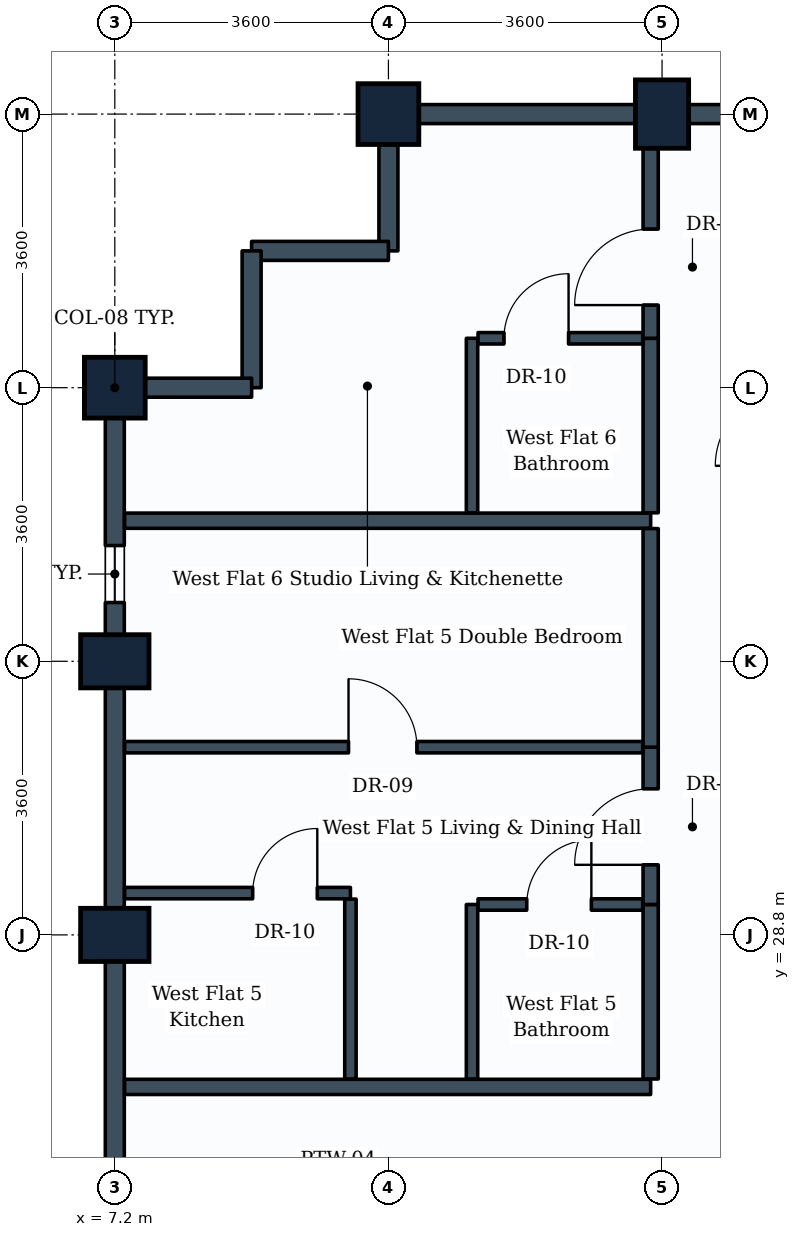
"""IFC4 building model, lengths in metres.
Left out: names, types, materials, properties, quantities, classifications, styles, units other than length and angle.
Written with IfcOpenShell. Run it as: python <this file> out.ifc"""

import sys

from ifc_helpers import new_model, si_unit, direction, frame, frame_2d, origin, origin_2d, place, context, subcontext, project, spatial, rectangle, extrude, element, fill, save


model = new_model("IFC4")
c1 = context("Model", 3, precision=1e-05, world=origin(), true_north=direction((0.0, 1.0)))
c2 = subcontext(c1, "Body", "Model", "MODEL_VIEW")
j1 = project(units=[si_unit("LENGTHUNIT", "METRE"), si_unit("PLANEANGLEUNIT", "RADIAN")], contexts=[c1])
p1 = place(None, origin())
s1 = spatial("IfcSite", under=j1, at=p1, CompositionType="ELEMENT")
p2 = place(p1, origin())
s2 = spatial("IfcBuilding", under=s1, at=p2, CompositionType="ELEMENT")
p3 = place(p2, frame((0.0, 0.0, 186.2)))
s3 = spatial("IfcBuildingStorey", under=s2, at=p3, CompositionType="ELEMENT", Elevation=186.2)
for number, where, z_axis, x_axis in (
    (1, (7.2, 28.8, 0.0), (0.0, 0.0, 1.0), (0.0, 1.0, 0.0)),
    (2, (7.2, 32.4, 0.0), (0.0, 0.0, 1.0), (0.0, 1.0, 0.0)),
):
    element("IfcColumn", number, at=place(p3, frame(where, z_axis=z_axis, x_axis=x_axis)), inside=s3, PredefinedType="COLUMN", context=c2, shape_type="SweptSolid", body=[
        extrude(rectangle(XDim=0.7, YDim=0.9, at=origin_2d()), origin(), (0.0, 0.0, 1.0), 3.8),
    ])
for number, where, z_axis, x_axis in (
    (3, (7.2, 36.0, 0.0), (0.0, 0.0, 1.0), (0.0, 1.0, 0.0)),
    (4, (10.8, 39.6, 0.0), (0.0, 0.0, 1.0), (1.0, 0.0, 0.0)),
):
    element("IfcColumn", number, at=place(p3, frame(where, z_axis=z_axis, x_axis=x_axis)), inside=s3, PredefinedType="COLUMN", context=c2, shape_type="SweptSolid", body=[
        extrude(rectangle(XDim=0.8, YDim=0.8, at=origin_2d()), origin(), (0.0, 0.0, 1.0), 3.8),
    ])
p4 = place(p3, frame((14.4, 39.6, 0.0), z_axis=(0.0, 0.0, 1.0), x_axis=(1.0, 0.0, 0.0)))
e5 = element("IfcColumn", 5, at=p4, inside=s3, PredefinedType="COLUMN", context=c2, shape_type="SweptSolid", body=[
    extrude(rectangle(XDim=0.7, YDim=0.9, at=origin_2d()), origin(), (0.0, 0.0, 1.0), 3.8),
])
p5 = place(p3, frame((14.4, 39.6, 0.0), z_axis=(0.0, 0.0, 1.0), x_axis=(1.0, 0.0, 0.0)))
e6 = element("IfcWall", 6, at=p5, inside=s3, PredefinedType="STANDARD", context=c2, shape_type="SweptSolid", body=[
    extrude(rectangle(XDim=3.6, YDim=0.25, at=frame_2d((1.8, 0.0))), origin(), (0.0, 0.0, 1.0), 2.93),
])
p6 = place(p3, frame((10.8, 39.6, 0.0), z_axis=(0.0, 0.0, 1.0), x_axis=(1.0, 0.0, 0.0)))
e7 = element("IfcWall", 7, at=p6, inside=s3, PredefinedType="STANDARD", context=c2, shape_type="SweptSolid", body=[
    extrude(rectangle(XDim=3.6, YDim=0.25, at=frame_2d((1.8, 0.0))), origin(), (0.0, 0.0, 1.0), 2.93),
])
p7 = place(p3, frame((10.8, 37.8, 0.0), z_axis=(0.0, 0.0, 1.0), x_axis=(0.0, 1.0, 0.0)))
e8 = element("IfcWall", 8, at=p7, inside=s3, PredefinedType="STANDARD", context=c2, shape_type="SweptSolid", body=[
    extrude(rectangle(XDim=1.8, YDim=0.25, at=frame_2d((0.9, 0.0))), origin(), (0.0, 0.0, 1.0), 2.93),
])
for number, where, z_axis, x_axis in (
    (9, (9.0, 37.8, 0.0), (0.0, 0.0, 1.0), (1.0, 0.0, 0.0)),
    (10, (9.0, 36.0, 0.0), (0.0, 0.0, 1.0), (0.0, 1.0, 0.0)),
):
    element("IfcWall", number, at=place(p3, frame(where, z_axis=z_axis, x_axis=x_axis)), inside=s3, PredefinedType="STANDARD", context=c2, shape_type="SweptSolid", body=[
        extrude(rectangle(XDim=1.8, YDim=0.25, at=frame_2d((0.9, 0.0))), origin(), (0.0, 0.0, 1.0), 3.535),
    ])
p8 = place(p3, frame((7.2, 36.0, 0.0), z_axis=(0.0, 0.0, 1.0), x_axis=(1.0, 0.0, 0.0)))
e11 = element("IfcWall", 11, at=p8, inside=s3, PredefinedType="STANDARD", context=c2, shape_type="SweptSolid", body=[
    extrude(rectangle(XDim=1.8, YDim=0.25, at=frame_2d((0.9, 0.0))), origin(), (0.0, 0.0, 1.0), 2.93),
])
p9 = place(p3, frame((7.2, 32.4, 0.0), z_axis=(0.0, 0.0, 1.0), x_axis=(0.0, 1.0, 0.0)))
e12 = element("IfcWall", 12, at=p9, inside=s3, PredefinedType="STANDARD", context=c2, shape_type="SweptSolid", body=[
    extrude(rectangle(XDim=3.6, YDim=0.25, at=frame_2d((1.8, 0.0))), origin(), (0.0, 0.0, 1.0), 2.93),
])
p10 = place(p9, frame((0.773, 0.0, 0.85)))
e13 = element("IfcOpeningElement", 13, at=p10, cuts=e12, PredefinedType="OPENING", context=c2, shape_type="SweptSolid", body=[
    extrude(rectangle(XDim=0.75, YDim=1.05, at=frame_2d((0.375, 0.525))), frame((0.0, 0.135, 0.0), z_axis=(0.0, -1.0, 0.0), x_axis=(1.0, 0.0, 0.0)), (0.0, 0.0, 1.0), 0.27),
])
p11 = place(p3, frame((7.2, 28.8, 0.0), z_axis=(0.0, 0.0, 1.0), x_axis=(0.0, 1.0, 0.0)))
e14 = element("IfcWall", 14, at=p11, inside=s3, PredefinedType="STANDARD", context=c2, shape_type="SweptSolid", body=[
    extrude(rectangle(XDim=3.6, YDim=0.25, at=frame_2d((1.8, 0.0))), origin(), (0.0, 0.0, 1.0), 2.93),
])
p12 = place(p3, frame((7.2, 25.2, 0.0), z_axis=(0.0, 0.0, 1.0), x_axis=(0.0, 1.0, 0.0)))
e15 = element("IfcWall", 15, at=p12, inside=s3, PredefinedType="STANDARD", context=c2, shape_type="SweptSolid", body=[
    extrude(rectangle(XDim=3.6, YDim=0.25, at=frame_2d((1.8, 0.0))), origin(), (0.0, 0.0, 1.0), 2.93),
])
for number, where, z_axis, x_axis in (
    (16, (7.329, 26.8, 0.0), (0.0, 0.0, 1.0), (1.0, 0.0, 0.0)),
    (17, (7.329, 34.25, 0.0), (0.0, 0.0, 1.0), (1.0, 0.0, 0.0)),
):
    element("IfcWall", number, at=place(p3, frame(where, z_axis=z_axis, x_axis=x_axis)), inside=s3, PredefinedType="PARTITIONING", context=c2, shape_type="SweptSolid", body=[
        extrude(rectangle(XDim=6.921, YDim=0.2, at=frame_2d((3.46, 0.0))), origin(), (0.0, 0.0, 1.0), 2.93),
    ])
p13 = place(p3, frame((14.25, 26.904, 0.0), z_axis=(0.0, 0.0, 1.0), x_axis=(0.0, 1.0, 0.0)))
e18 = element("IfcWall", 18, at=p13, inside=s3, PredefinedType="PARTITIONING", context=c2, shape_type="SweptSolid", body=[
    extrude(rectangle(XDim=2.296, YDim=0.2, at=frame_2d((1.148, 0.0))), origin(), (0.0, 0.0, 1.0), 3.17),
])
p14 = place(p3, frame((11.9, 26.904, 0.0), z_axis=(0.0, 0.0, 1.0), x_axis=(0.0, 1.0, 0.0)))
e19 = element("IfcWall", 19, at=p14, inside=s3, PredefinedType="PARTITIONING", context=c2, shape_type="SweptSolid", body=[
    extrude(rectangle(XDim=2.296, YDim=0.15, at=frame_2d((1.148, 0.0))), origin(), (0.0, 0.0, 1.0), 3.22),
])
p15 = place(p3, frame((11.979, 29.2, 0.0), z_axis=(0.0, 0.0, 1.0), x_axis=(1.0, 0.0, 0.0)))
e20 = element("IfcWall", 20, at=p15, inside=s3, PredefinedType="PARTITIONING", context=c2, shape_type="SweptSolid", body=[
    extrude(rectangle(XDim=2.167, YDim=0.15, at=frame_2d((1.083, 0.0))), origin(), (0.0, 0.0, 1.0), 3.535),
])
p16 = place(p15, frame((0.641, 0.0, 0.0)))
e21 = element("IfcOpeningElement", 21, at=p16, cuts=e20, PredefinedType="OPENING", context=c2, shape_type="SweptSolid", body=[
    extrude(rectangle(XDim=0.85, YDim=2.1, at=frame_2d((0.425, 1.05))), frame((0.0, 0.085, 0.0), z_axis=(0.0, -1.0, 0.0), x_axis=(1.0, 0.0, 0.0)), (0.0, 0.0, 1.0), 0.17),
])
p17 = place(p3, frame((14.25, 29.2, 0.0), z_axis=(0.0, 0.0, 1.0), x_axis=(0.0, 1.0, 0.0)))
e22 = element("IfcWall", 22, at=p17, inside=s3, PredefinedType="PARTITIONING", context=c2, shape_type="SweptSolid", body=[
    extrude(rectangle(XDim=2.07, YDim=0.2, at=frame_2d((1.035, 0.0))), origin(), (0.0, 0.0, 1.0), 3.17),
])
p18 = place(p17, frame((0.522, 0.0, 0.0)))
e23 = element("IfcOpeningElement", 23, at=p18, cuts=e22, PredefinedType="OPENING", context=c2, shape_type="SweptSolid", body=[
    extrude(rectangle(XDim=1.0, YDim=2.1, at=frame_2d((0.5, 1.05))), frame((0.0, 0.11, 0.0), z_axis=(0.0, -1.0, 0.0), x_axis=(1.0, 0.0, 0.0)), (0.0, 0.0, 1.0), 0.22),
])
p19 = place(p3, frame((14.25, 31.27, 0.0), z_axis=(0.0, 0.0, 1.0), x_axis=(0.0, 1.0, 0.0)))
e24 = element("IfcWall", 24, at=p19, inside=s3, PredefinedType="PARTITIONING", context=c2, shape_type="SweptSolid", body=[
    extrude(rectangle(XDim=2.876, YDim=0.2, at=frame_2d((1.438, 0.0))), origin(), (0.0, 0.0, 1.0), 3.17),
])
p20 = place(p3, frame((7.329, 31.27, 0.0), z_axis=(0.0, 0.0, 1.0), x_axis=(1.0, 0.0, 0.0)))
e25 = element("IfcWall", 25, at=p20, inside=s3, PredefinedType="PARTITIONING", context=c2, shape_type="SweptSolid", body=[
    extrude(rectangle(XDim=6.817, YDim=0.15, at=frame_2d((3.408, 0.0))), origin(), (0.0, 0.0, 1.0), 2.93),
])
p21 = place(p20, frame((2.946, 0.0, 0.0)))
e26 = element("IfcOpeningElement", 26, at=p21, cuts=e25, PredefinedType="OPENING", context=c2, shape_type="SweptSolid", body=[
    extrude(rectangle(XDim=0.9, YDim=2.1, at=frame_2d((0.45, 1.05))), frame((0.0, 0.085, 0.0), z_axis=(0.0, -1.0, 0.0), x_axis=(1.0, 0.0, 0.0)), (0.0, 0.0, 1.0), 0.17),
])
p22 = place(p3, frame((7.329, 29.35, 0.0), z_axis=(0.0, 0.0, 1.0), x_axis=(1.0, 0.0, 0.0)))
e27 = element("IfcWall", 27, at=p22, inside=s3, PredefinedType="PARTITIONING", context=c2, shape_type="SweptSolid", body=[
    extrude(rectangle(XDim=2.971, YDim=0.15, at=frame_2d((1.485, 0.0))), origin(), (0.0, 0.0, 1.0), 2.93),
])
p23 = place(p22, frame((1.685, 0.0, 0.0)))
e28 = element("IfcOpeningElement", 28, at=p23, cuts=e27, PredefinedType="OPENING", context=c2, shape_type="SweptSolid", body=[
    extrude(rectangle(XDim=0.85, YDim=2.1, at=frame_2d((0.425, 1.05))), frame((0.0, 0.085, 0.0), z_axis=(0.0, -1.0, 0.0), x_axis=(1.0, 0.0, 0.0)), (0.0, 0.0, 1.0), 0.17),
])
p24 = place(p3, frame((10.3, 26.904, 0.0), z_axis=(0.0, 0.0, 1.0), x_axis=(0.0, 1.0, 0.0)))
e29 = element("IfcWall", 29, at=p24, inside=s3, PredefinedType="PARTITIONING", context=c2, shape_type="SweptSolid", body=[
    extrude(rectangle(XDim=2.367, YDim=0.15, at=frame_2d((1.184, 0.0))), origin(), (0.0, 0.0, 1.0), 3.22),
])
p25 = place(p3, frame((14.25, 34.354, 0.0), z_axis=(0.0, 0.0, 1.0), x_axis=(0.0, 1.0, 0.0)))
e30 = element("IfcWall", 30, at=p25, inside=s3, PredefinedType="PARTITIONING", context=c2, shape_type="SweptSolid", body=[
    extrude(rectangle(XDim=2.296, YDim=0.2, at=frame_2d((1.148, 0.0))), origin(), (0.0, 0.0, 1.0), 3.535),
])
p26 = place(p3, frame((11.9, 34.354, 0.0), z_axis=(0.0, 0.0, 1.0), x_axis=(0.0, 1.0, 0.0)))
e31 = element("IfcWall", 31, at=p26, inside=s3, PredefinedType="PARTITIONING", context=c2, shape_type="SweptSolid", body=[
    extrude(rectangle(XDim=2.296, YDim=0.15, at=frame_2d((1.148, 0.0))), origin(), (0.0, 0.0, 1.0), 3.535),
])
p27 = place(p3, frame((11.979, 36.65, 0.0), z_axis=(0.0, 0.0, 1.0), x_axis=(1.0, 0.0, 0.0)))
e32 = element("IfcWall", 32, at=p27, inside=s3, PredefinedType="PARTITIONING", context=c2, shape_type="SweptSolid", body=[
    extrude(rectangle(XDim=2.167, YDim=0.15, at=frame_2d((1.083, 0.0))), origin(), (0.0, 0.0, 1.0), 3.535),
])
p28 = place(p27, frame((0.341, 0.0, 0.0)))
e33 = element("IfcOpeningElement", 33, at=p28, cuts=e32, PredefinedType="OPENING", context=c2, shape_type="SweptSolid", body=[
    extrude(rectangle(XDim=0.85, YDim=2.1, at=frame_2d((0.425, 1.05))), frame((0.0, 0.085, 0.0), z_axis=(0.0, -1.0, 0.0), x_axis=(1.0, 0.0, 0.0)), (0.0, 0.0, 1.0), 0.17),
])
p29 = place(p3, frame((14.25, 36.65, 0.0), z_axis=(0.0, 0.0, 1.0), x_axis=(0.0, 1.0, 0.0)))
e34 = element("IfcWall", 34, at=p29, inside=s3, PredefinedType="PARTITIONING", context=c2, shape_type="SweptSolid", body=[
    extrude(rectangle(XDim=2.821, YDim=0.2, at=frame_2d((1.411, 0.0))), origin(), (0.0, 0.0, 1.0), 2.93),
])
p30 = place(p29, frame((0.437, 0.0, 0.0)))
e35 = element("IfcOpeningElement", 35, at=p30, cuts=e34, PredefinedType="OPENING", context=c2, shape_type="SweptSolid", body=[
    extrude(rectangle(XDim=1.0, YDim=2.1, at=frame_2d((0.5, 1.05))), frame((0.0, 0.11, 0.0), z_axis=(0.0, -1.0, 0.0), x_axis=(1.0, 0.0, 0.0)), (0.0, 0.0, 1.0), 0.22),
])
p31 = place(p16, origin())
e36 = element("IfcDoor", 36, at=p31, inside=s3, OperationType="SINGLE_SWING_RIGHT", PredefinedType="DOOR", context=c2, shape_type="SweptSolid", body=[
    extrude(rectangle(XDim=0.85, YDim=2.1, at=frame_2d((0.425, 1.05))), frame((0.0, 0.025, 0.0), z_axis=(0.0, -1.0, 0.0), x_axis=(1.0, 0.0, 0.0)), (0.0, 0.0, 1.0), 0.05),
])
fill(e21, e36)
p32 = place(p18, origin())
e37 = element("IfcDoor", 37, at=p32, inside=s3, OperationType="SINGLE_SWING_LEFT", PredefinedType="DOOR", context=c2, shape_type="SweptSolid", body=[
    extrude(rectangle(XDim=1.0, YDim=2.1, at=frame_2d((0.5, 1.05))), frame((0.0, 0.025, 0.0), z_axis=(0.0, -1.0, 0.0), x_axis=(1.0, 0.0, 0.0)), (0.0, 0.0, 1.0), 0.05),
])
fill(e23, e37)
p33 = place(p21, origin())
e38 = element("IfcDoor", 38, at=p33, inside=s3, OperationType="SINGLE_SWING_LEFT", PredefinedType="DOOR", context=c2, shape_type="SweptSolid", body=[
    extrude(rectangle(XDim=0.9, YDim=2.1, at=frame_2d((0.45, 1.05))), frame((0.0, 0.025, 0.0), z_axis=(0.0, -1.0, 0.0), x_axis=(1.0, 0.0, 0.0)), (0.0, 0.0, 1.0), 0.05),
])
fill(e26, e38)
p34 = place(p23, origin())
e39 = element("IfcDoor", 39, at=p34, inside=s3, OperationType="SINGLE_SWING_RIGHT", PredefinedType="DOOR", context=c2, shape_type="SweptSolid", body=[
    extrude(rectangle(XDim=0.85, YDim=2.1, at=frame_2d((0.425, 1.05))), frame((0.0, 0.025, 0.0), z_axis=(0.0, -1.0, 0.0), x_axis=(1.0, 0.0, 0.0)), (0.0, 0.0, 1.0), 0.05),
])
fill(e28, e39)
p35 = place(p28, origin())
e40 = element("IfcDoor", 40, at=p35, inside=s3, OperationType="SINGLE_SWING_RIGHT", PredefinedType="DOOR", context=c2, shape_type="SweptSolid", body=[
    extrude(rectangle(XDim=0.85, YDim=2.1, at=frame_2d((0.425, 1.05))), frame((0.0, 0.025, 0.0), z_axis=(0.0, -1.0, 0.0), x_axis=(1.0, 0.0, 0.0)), (0.0, 0.0, 1.0), 0.05),
])
fill(e33, e40)
p36 = place(p30, origin())
e41 = element("IfcDoor", 41, at=p36, inside=s3, OperationType="SINGLE_SWING_LEFT", PredefinedType="DOOR", context=c2, shape_type="SweptSolid", body=[
    extrude(rectangle(XDim=1.0, YDim=2.1, at=frame_2d((0.5, 1.05))), frame((0.0, 0.025, 0.0), z_axis=(0.0, -1.0, 0.0), x_axis=(1.0, 0.0, 0.0)), (0.0, 0.0, 1.0), 0.05),
])
fill(e35, e41)
p37 = place(p10, origin())
e42 = element("IfcWindow", 42, at=p37, inside=s3, PartitioningType="SINGLE_PANEL", PredefinedType="WINDOW", context=c2, shape_type="SweptSolid", body=[
    extrude(rectangle(XDim=0.75, YDim=1.05, at=frame_2d((0.375, 0.525))), frame((0.0, 0.03, 0.0), z_axis=(0.0, -1.0, 0.0), x_axis=(1.0, 0.0, 0.0)), (0.0, 0.0, 1.0), 0.06),
])
fill(e13, e42)
save(model, sys.argv[1])
